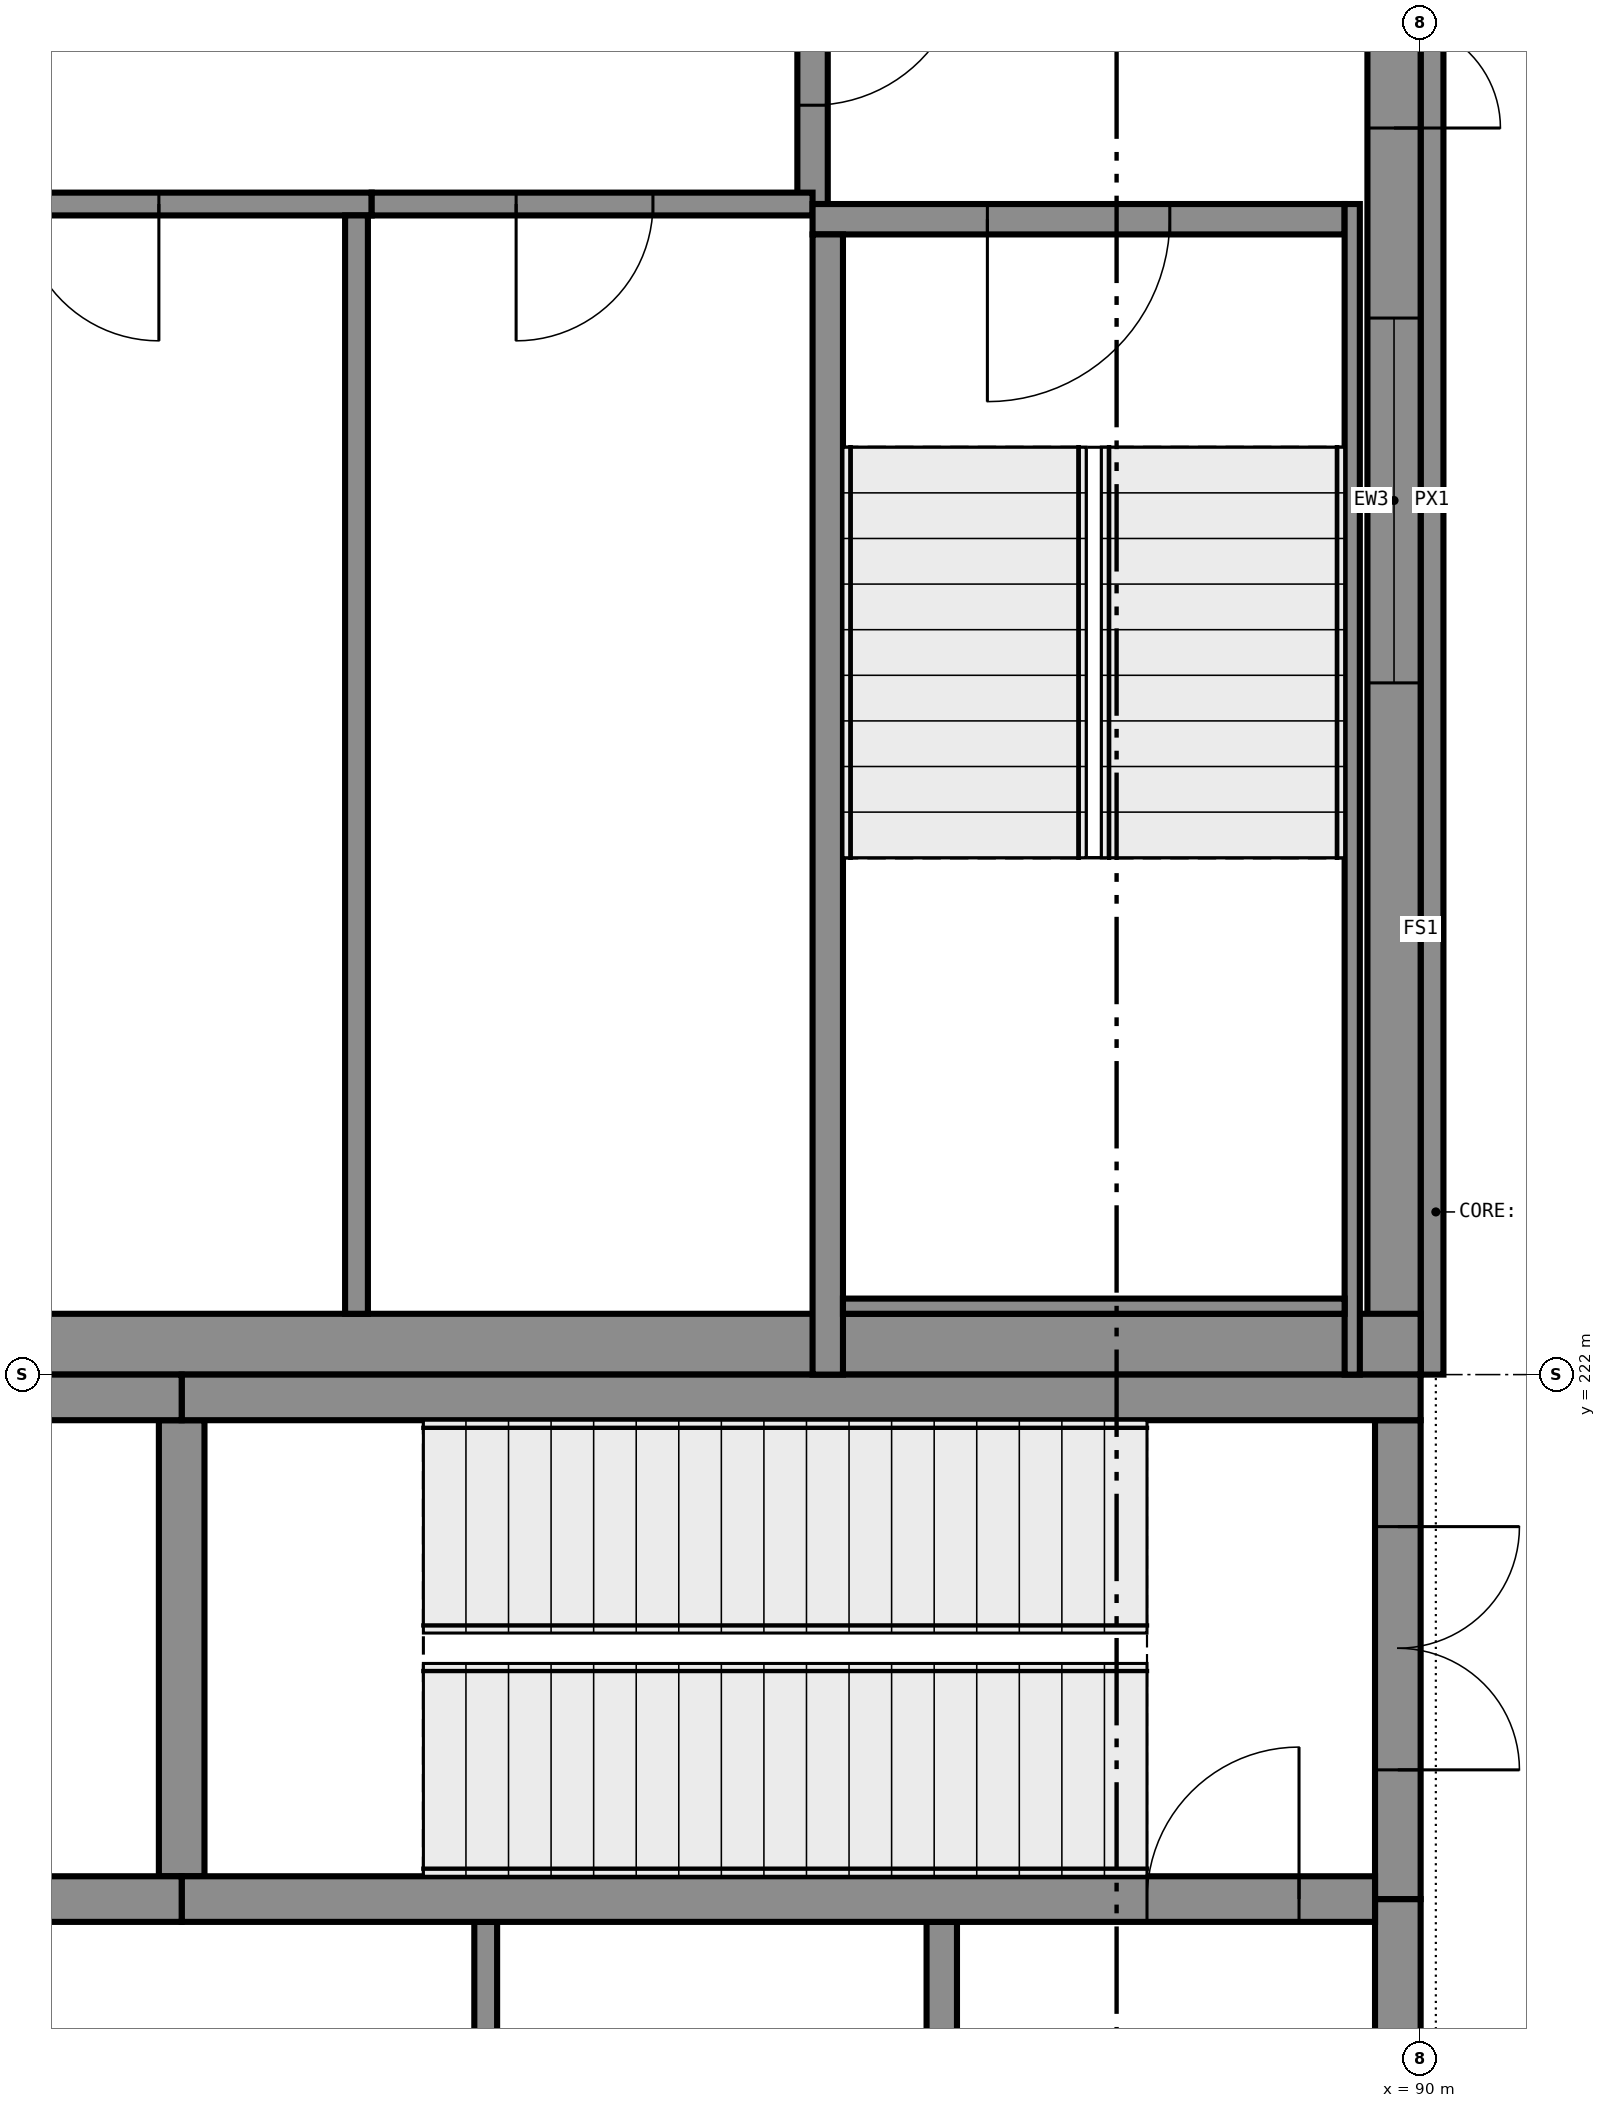
"""IFC4 building model, lengths in metres.
Left out: names, types, materials, properties, quantities, classifications, styles, units other than length and angle.
Written with IfcOpenShell. Run it as: python <this file> out.ifc"""

import sys

from ifc_helpers import new_model, si_unit, direction, frame, frame_2d, origin, place, context, subcontext, project, spatial, rectangle, extrude, element, fill, save


model = new_model("IFC4")
c1 = context("Model", 3, precision=1e-05, world=origin(), true_north=direction((0.0, 1.0)))
c2 = subcontext(c1, "Body", "Model", "MODEL_VIEW")
j1 = project(units=[si_unit("LENGTHUNIT", "METRE"), si_unit("PLANEANGLEUNIT", "RADIAN")], contexts=[c1])
p1 = place(None, origin())
s1 = spatial("IfcSite", under=j1, at=p1, CompositionType="ELEMENT")
p2 = place(p1, origin())
s2 = spatial("IfcBuilding", under=s1, at=p2, CompositionType="ELEMENT")
p3 = place(p2, origin())
s3 = spatial("IfcBuildingStorey", under=s2, at=p3, CompositionType="ELEMENT", Elevation=0.0)
p4 = place(p3, frame((90.0, 221.85, 0.0), z_axis=(0.0, 0.0, 1.0), x_axis=(-1.0, 0.0, 0.0)))
e1 = element("IfcWall", 1, at=p4, inside=s3, PredefinedType="SHEAR", context=c2, shape_type="SweptSolid", body=[
    extrude(rectangle(XDim=8.15, YDim=0.3, at=frame_2d((4.075, 0.0))), origin(), (0.0, 0.0, 1.0), 5.75),
])
p5 = place(p3, frame((81.85, 221.85, 0.0), z_axis=(0.0, 0.0, 1.0), x_axis=(-1.0, 0.0, 0.0)))
e2 = element("IfcWall", 2, at=p5, inside=s3, PredefinedType="SHEAR", context=c2, shape_type="SweptSolid", body=[
    extrude(rectangle(XDim=3.85, YDim=0.3, at=frame_2d((1.925, 0.0))), origin(), (0.0, 0.0, 1.0), 5.75),
])
p6 = place(p3, frame((89.7, 218.55, 0.0), z_axis=(0.0, 0.0, 1.0), x_axis=(-1.0, 0.0, 0.0)))
e3 = element("IfcWall", 3, at=p6, inside=s3, PredefinedType="SHEAR", context=c2, shape_type="SweptSolid", body=[
    extrude(rectangle(XDim=7.85, YDim=0.3, at=frame_2d((3.925, 0.0))), origin(), (0.0, 0.0, 1.0), 5.75),
])
p7 = place(p6, frame((0.5, 0.0, 0.0)))
e4 = element("IfcOpeningElement", 4, at=p7, cuts=e3, PredefinedType="OPENING", context=c2, shape_type="SweptSolid", body=[
    extrude(rectangle(XDim=1.0, YDim=2.1, at=frame_2d((0.5, 1.05))), frame((0.0, 0.16, 0.0), z_axis=(0.0, -1.0, 0.0), x_axis=(1.0, 0.0, 0.0)), (0.0, 0.0, 1.0), 0.32),
])
p8 = place(p3, frame((81.85, 218.55, 0.0), z_axis=(0.0, 0.0, 1.0), x_axis=(-1.0, 0.0, 0.0)))
e5 = element("IfcWall", 5, at=p8, inside=s3, PredefinedType="SHEAR", context=c2, shape_type="SweptSolid", body=[
    extrude(rectangle(XDim=3.55, YDim=0.3, at=frame_2d((1.775, 0.0))), origin(), (0.0, 0.0, 1.0), 5.75),
])
p9 = place(p3, frame((89.85, 213.45, 0.0), z_axis=(0.0, 0.0, 1.0), x_axis=(0.0, 1.0, 0.0)))
e6 = element("IfcWall", 6, at=p9, inside=s3, PredefinedType="SHEAR", context=c2, shape_type="SweptSolid", body=[
    extrude(rectangle(XDim=5.1, YDim=0.3, at=frame_2d((2.55, 0.0))), origin(), (0.0, 0.0, 1.0), 5.75),
])
p10 = place(p3, frame((89.85, 218.55, 0.0), z_axis=(0.0, 0.0, 1.0), x_axis=(0.0, 1.0, 0.0)))
e7 = element("IfcWall", 7, at=p10, inside=s3, PredefinedType="SHEAR", context=c2, shape_type="SweptSolid", body=[
    extrude(rectangle(XDim=3.15, YDim=0.3, at=frame_2d((1.575, 0.0))), origin(), (0.0, 0.0, 1.0), 5.75),
])
p11 = place(p10, frame((0.85, 0.0, 0.0)))
e8 = element("IfcOpeningElement", 8, at=p11, cuts=e7, PredefinedType="OPENING", context=c2, shape_type="SweptSolid", body=[
    extrude(rectangle(XDim=1.6, YDim=2.1, at=frame_2d((0.8, 1.05))), frame((0.0, 0.16, 0.0), z_axis=(0.0, -1.0, 0.0), x_axis=(1.0, 0.0, 0.0)), (0.0, 0.0, 1.0), 0.32),
])
p12 = place(p3, frame((81.85, 218.7, 0.0), z_axis=(0.0, 0.0, 1.0), x_axis=(0.0, 1.0, 0.0)))
e9 = element("IfcWall", 9, at=p12, inside=s3, PredefinedType="SHEAR", context=c2, shape_type="SweptSolid", body=[
    extrude(rectangle(XDim=3.0, YDim=0.3, at=frame_2d((1.5, 0.0))), origin(), (0.0, 0.0, 1.0), 5.75),
])
p13 = place(p3, frame((89.5, 229.6, 0.0), z_axis=(0.0, 0.0, 1.0), x_axis=(-1.0, 0.0, 0.0)))
e10 = element("IfcWall", 10, at=p13, inside=s3, PredefinedType="SHEAR", context=c2, shape_type="SweptSolid", body=[
    extrude(rectangle(XDim=3.5, YDim=0.2, at=frame_2d((1.75, 0.0))), origin(), (0.0, 0.0, 1.0), 6.0),
])
p14 = place(p13, frame((1.15, 0.0, 0.0)))
e11 = element("IfcOpeningElement", 11, at=p14, cuts=e10, PredefinedType="OPENING", context=c2, shape_type="SweptSolid", body=[
    extrude(rectangle(XDim=1.2, YDim=2.1, at=frame_2d((0.6, 1.05))), frame((0.0, 0.11, 0.0), z_axis=(0.0, -1.0, 0.0), x_axis=(1.0, 0.0, 0.0)), (0.0, 0.0, 1.0), 0.22),
])
p15 = place(p3, frame((86.1, 222.0, 0.0), z_axis=(0.0, 0.0, 1.0), x_axis=(0.0, 1.0, 0.0)))
e12 = element("IfcWall", 12, at=p15, inside=s3, PredefinedType="SHEAR", context=c2, shape_type="SweptSolid", body=[
    extrude(rectangle(XDim=7.5, YDim=0.2, at=frame_2d((3.75, 0.0))), origin(), (0.0, 0.0, 1.0), 6.0),
])
p16 = place(p3, frame((89.55, 229.7, 0.0), z_axis=(0.0, 0.0, 1.0), x_axis=(0.0, -1.0, 0.0)))
e13 = element("IfcWall", 13, at=p16, inside=s3, PredefinedType="SHEAR", context=c2, shape_type="SweptSolid", body=[
    extrude(rectangle(XDim=7.7, YDim=0.1, at=frame_2d((3.85, 0.0))), origin(), (0.0, 0.0, 1.0), 5.75),
])
p17 = place(p3, frame((89.5, 222.45, 0.0), z_axis=(0.0, 0.0, 1.0), x_axis=(-1.0, 0.0, 0.0)))
e14 = element("IfcWall", 14, at=p17, inside=s3, PredefinedType="SHEAR", context=c2, shape_type="SweptSolid", body=[
    extrude(rectangle(XDim=3.3, YDim=0.1, at=frame_2d((1.65, 0.0))), origin(), (0.0, 0.0, 1.0), 5.75),
])
p18 = place(p3, frame((66.5, 222.2, 0.0), z_axis=(0.0, 0.0, 1.0), x_axis=(1.0, 0.0, 0.0)))
e15 = element("IfcWall", 15, at=p18, inside=s3, PredefinedType="SOLIDWALL", context=c2, shape_type="SweptSolid", body=[
    extrude(rectangle(XDim=23.5, YDim=0.4, at=frame_2d((11.75, 0.0))), origin(), (0.0, 0.0, 1.0), 4.75),
])
p19 = place(p18, frame((4.6, 0.0, 0.0)))
e16 = element("IfcOpeningElement", 16, at=p19, cuts=e15, PredefinedType="OPENING", context=c2, shape_type="SweptSolid", body=[
    extrude(rectangle(XDim=1.8, YDim=2.1, at=frame_2d((0.9, 1.05))), frame((0.0, 0.21, 0.0), z_axis=(0.0, -1.0, 0.0), x_axis=(1.0, 0.0, 0.0)), (0.0, 0.0, 1.0), 0.42),
])
p20 = place(p3, frame((89.825, 222.0, 0.0), z_axis=(0.0, 0.0, 1.0), x_axis=(0.0, 1.0, 0.0)))
e17 = element("IfcWall", 17, at=p20, inside=s3, PredefinedType="STANDARD", context=c2, shape_type="SweptSolid", body=[
    extrude(rectangle(XDim=11.5, YDim=0.35, at=frame_2d((5.75, 0.0))), origin(), (0.0, 0.0, 1.0), 4.75),
])
p21 = place(p20, frame((8.2, 0.0, 0.0)))
e18 = element("IfcOpeningElement", 18, at=p21, cuts=e17, PredefinedType="OPENING", context=c2, shape_type="SweptSolid", body=[
    extrude(rectangle(XDim=1.4, YDim=2.4, at=frame_2d((0.7, 1.2))), frame((0.0, 0.185, 0.0), z_axis=(0.0, -1.0, 0.0), x_axis=(1.0, 0.0, 0.0)), (0.0, 0.0, 1.0), 0.37),
])
p22 = place(p20, frame((4.55, 0.0, 0.45)))
e19 = element("IfcOpeningElement", 19, at=p22, cuts=e17, PredefinedType="OPENING", context=c2, shape_type="SweptSolid", body=[
    extrude(rectangle(XDim=2.4, YDim=3.0, at=frame_2d((1.2, 1.5))), frame((0.0, 0.185, 0.0), z_axis=(0.0, -1.0, 0.0), x_axis=(1.0, 0.0, 0.0)), (0.0, 0.0, 1.0), 0.37),
])
p23 = place(p3, frame((90.075, 222.0, 5.75), z_axis=(0.0, 0.0, 1.0), x_axis=(0.0, 1.0, 0.0)))
e20 = element("IfcWall", 20, at=p23, inside=s3, PredefinedType="STANDARD", context=c2, shape_type="SweptSolid", body=[
    extrude(rectangle(XDim=11.5, YDim=0.15, at=frame_2d((5.75, 0.0))), origin(), (0.0, 0.0, 1.0), 0.25),
])
p24 = place(p3, frame((83.85, 215.65, 0.0), z_axis=(0.0, 0.0, 1.0), x_axis=(0.0, 1.0, 0.0)))
e21 = element("IfcWall", 21, at=p24, inside=s3, PredefinedType="PARTITIONING", context=c2, shape_type="SweptSolid", body=[
    extrude(rectangle(XDim=2.75, YDim=0.15, at=frame_2d((1.375, 0.0))), origin(), (0.0, 0.0, 1.0), 5.75),
])
p25 = place(p3, frame((86.85, 215.65, 0.0), z_axis=(0.0, 0.0, 1.0), x_axis=(0.0, 1.0, 0.0)))
e22 = element("IfcWall", 22, at=p25, inside=s3, PredefinedType="PARTITIONING", context=c2, shape_type="SweptSolid", body=[
    extrude(rectangle(XDim=2.75, YDim=0.2, at=frame_2d((1.375, 0.0))), origin(), (0.0, 0.0, 1.0), 5.75),
])
p26 = place(p3, frame((86.0, 232.0, 0.0), z_axis=(0.0, 0.0, 1.0), x_axis=(0.0, -1.0, 0.0)))
e23 = element("IfcWall", 23, at=p26, inside=s3, PredefinedType="PARTITIONING", context=c2, shape_type="SweptSolid", body=[
    extrude(rectangle(XDim=2.3, YDim=0.2, at=frame_2d((1.15, 0.0))), origin(), (0.0, 0.0, 1.0), 5.75),
])
p27 = place(p26, frame((0.65, 0.0, 0.0)))
e24 = element("IfcOpeningElement", 24, at=p27, cuts=e23, PredefinedType="OPENING", context=c2, shape_type="SweptSolid", body=[
    extrude(rectangle(XDim=1.0, YDim=2.1, at=frame_2d((0.5, 1.05))), frame((0.0, 0.11, 0.0), z_axis=(0.0, -1.0, 0.0), x_axis=(1.0, 0.0, 0.0)), (0.0, 0.0, 1.0), 0.22),
])
p28 = place(p3, frame((83.1, 229.7, 0.0), z_axis=(0.0, 0.0, 1.0), x_axis=(-1.0, 0.0, 0.0)))
e25 = element("IfcWall", 25, at=p28, inside=s3, PredefinedType="PARTITIONING", context=c2, shape_type="SweptSolid", body=[
    extrude(rectangle(XDim=3.5, YDim=0.15, at=frame_2d((1.75, 0.0))), origin(), (0.0, 0.0, 1.0), 5.75),
])
p29 = place(p28, frame((1.4, 0.0, 0.0)))
e26 = element("IfcOpeningElement", 26, at=p29, cuts=e25, PredefinedType="OPENING", context=c2, shape_type="SweptSolid", body=[
    extrude(rectangle(XDim=0.9, YDim=2.1, at=frame_2d((0.45, 1.05))), frame((0.0, 0.085, 0.0), z_axis=(0.0, -1.0, 0.0), x_axis=(1.0, 0.0, 0.0)), (0.0, 0.0, 1.0), 0.17),
])
p30 = place(p3, frame((86.0, 229.7, 0.0), z_axis=(0.0, 0.0, 1.0), x_axis=(-1.0, 0.0, 0.0)))
e27 = element("IfcWall", 27, at=p30, inside=s3, PredefinedType="PARTITIONING", context=c2, shape_type="SweptSolid", body=[
    extrude(rectangle(XDim=2.9, YDim=0.15, at=frame_2d((1.45, 0.0))), origin(), (0.0, 0.0, 1.0), 5.75),
])
p31 = place(p30, frame((1.05, 0.0, 0.0)))
e28 = element("IfcOpeningElement", 28, at=p31, cuts=e27, PredefinedType="OPENING", context=c2, shape_type="SweptSolid", body=[
    extrude(rectangle(XDim=0.9, YDim=2.1, at=frame_2d((0.45, 1.05))), frame((0.0, 0.085, 0.0), z_axis=(0.0, -1.0, 0.0), x_axis=(1.0, 0.0, 0.0)), (0.0, 0.0, 1.0), 0.17),
])
p32 = place(p3, frame((83.0, 222.4, 0.0), z_axis=(0.0, 0.0, 1.0), x_axis=(0.0, 1.0, 0.0)))
e29 = element("IfcWall", 29, at=p32, inside=s3, PredefinedType="PARTITIONING", context=c2, shape_type="SweptSolid", body=[
    extrude(rectangle(XDim=7.225, YDim=0.15, at=frame_2d((3.613, 0.0))), origin(), (0.0, 0.0, 1.0), 5.75),
])
p33 = place(p21, frame((1.4, 0.0, 0.0), z_axis=(0.0, 0.0, 1.0), x_axis=(-1.0, 0.0, 0.0)))
e30 = element("IfcDoor", 30, at=p33, inside=s3, OperationType="DOUBLE_DOOR_SINGLE_SWING", PredefinedType="DOOR", context=c2, shape_type="SweptSolid", body=[
    extrude(rectangle(XDim=1.4, YDim=2.4, at=frame_2d((0.7, 1.2))), frame((0.0, 0.025, 0.0), z_axis=(0.0, -1.0, 0.0), x_axis=(1.0, 0.0, 0.0)), (0.0, 0.0, 1.0), 0.05),
])
fill(e18, e30)
p34 = place(p22, origin())
e31 = element("IfcWindow", 31, at=p34, inside=s3, PartitioningType="SINGLE_PANEL", PredefinedType="WINDOW", context=c2, shape_type="SweptSolid", body=[
    extrude(rectangle(XDim=2.4, YDim=3.0, at=frame_2d((1.2, 1.5))), frame((0.0, 0.03, 0.0), z_axis=(0.0, -1.0, 0.0), x_axis=(1.0, 0.0, 0.0)), (0.0, 0.0, 1.0), 0.06),
])
fill(e19, e31)
p35 = place(p7, frame((1.0, 0.0, 0.0), z_axis=(0.0, 0.0, 1.0), x_axis=(-1.0, 0.0, 0.0)))
e32 = element("IfcDoor", 32, at=p35, inside=s3, OperationType="SINGLE_SWING_LEFT", PredefinedType="DOOR", context=c2, shape_type="SweptSolid", body=[
    extrude(rectangle(XDim=1.0, YDim=2.1, at=frame_2d((0.5, 1.05))), frame((0.0, 0.025, 0.0), z_axis=(0.0, -1.0, 0.0), x_axis=(1.0, 0.0, 0.0)), (0.0, 0.0, 1.0), 0.05),
])
fill(e4, e32)
p36 = place(p11, frame((1.6, 0.0, 0.0), z_axis=(0.0, 0.0, 1.0), x_axis=(-1.0, 0.0, 0.0)))
e33 = element("IfcDoor", 33, at=p36, inside=s3, OperationType="DOUBLE_DOOR_SINGLE_SWING", PredefinedType="DOOR", context=c2, shape_type="SweptSolid", body=[
    extrude(rectangle(XDim=1.6, YDim=2.1, at=frame_2d((0.8, 1.05))), frame((0.0, 0.025, 0.0), z_axis=(0.0, -1.0, 0.0), x_axis=(1.0, 0.0, 0.0)), (0.0, 0.0, 1.0), 0.05),
])
fill(e8, e33)
p37 = place(p27, origin())
e34 = element("IfcDoor", 34, at=p37, inside=s3, OperationType="SINGLE_SWING_LEFT", PredefinedType="DOOR", context=c2, shape_type="SweptSolid", body=[
    extrude(rectangle(XDim=1.0, YDim=2.1, at=frame_2d((0.5, 1.05))), frame((0.0, 0.025, 0.0), z_axis=(0.0, -1.0, 0.0), x_axis=(1.0, 0.0, 0.0)), (0.0, 0.0, 1.0), 0.05),
])
fill(e24, e34)
p38 = place(p29, origin())
e35 = element("IfcDoor", 35, at=p38, inside=s3, OperationType="SINGLE_SWING_LEFT", PredefinedType="DOOR", context=c2, shape_type="SweptSolid", body=[
    extrude(rectangle(XDim=0.9, YDim=2.1, at=frame_2d((0.45, 1.05))), frame((0.0, 0.025, 0.0), z_axis=(0.0, -1.0, 0.0), x_axis=(1.0, 0.0, 0.0)), (0.0, 0.0, 1.0), 0.05),
])
fill(e26, e35)
p39 = place(p31, origin())
e36 = element("IfcDoor", 36, at=p39, inside=s3, OperationType="SINGLE_SWING_RIGHT", PredefinedType="DOOR", context=c2, shape_type="SweptSolid", body=[
    extrude(rectangle(XDim=0.9, YDim=2.1, at=frame_2d((0.45, 1.05))), frame((0.0, 0.025, 0.0), z_axis=(0.0, -1.0, 0.0), x_axis=(1.0, 0.0, 0.0)), (0.0, 0.0, 1.0), 0.05),
])
fill(e28, e36)
p40 = place(p14, origin())
e37 = element("IfcDoor", 37, at=p40, inside=s3, OperationType="SINGLE_SWING_RIGHT", PredefinedType="DOOR", context=c2, shape_type="SweptSolid", body=[
    extrude(rectangle(XDim=1.2, YDim=2.1, at=frame_2d((0.6, 1.05))), frame((0.0, 0.025, 0.0), z_axis=(0.0, -1.0, 0.0), x_axis=(1.0, 0.0, 0.0)), (0.0, 0.0, 1.0), 0.05),
])
fill(e11, e37)
save(model, sys.argv[1])
